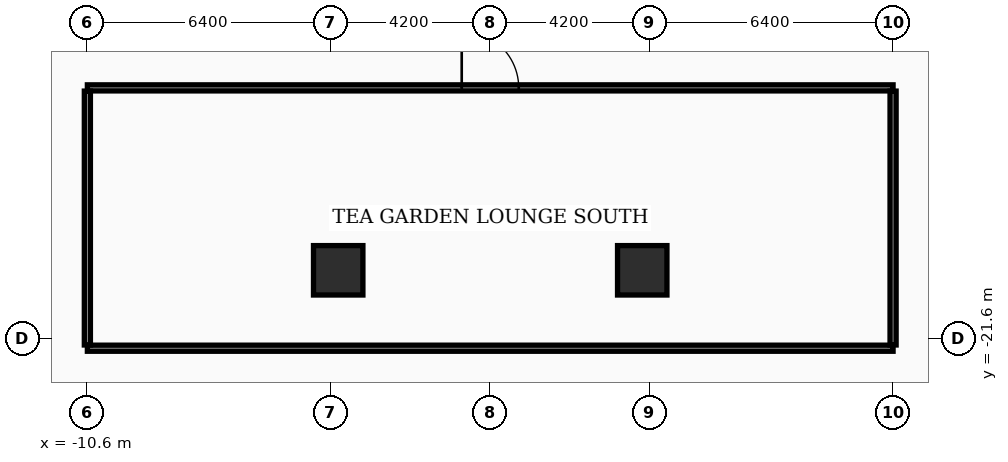
"""IFC4 building model, lengths in metres.
Left out: names, types, materials, properties, quantities, classifications, styles, units other than length and angle.
Written with IfcOpenShell. Run it as: python <this file> out.ifc"""

import sys

from ifc_helpers import new_model, si_unit, direction, frame, frame_2d, origin, origin_2d, place, context, subcontext, project, spatial, rectangle, extrude, element, fill, save


model = new_model("IFC4")
c1 = context("Model", 3, precision=1e-05, world=origin(), true_north=direction((0.0, 1.0)))
c2 = subcontext(c1, "Body", "Model", "MODEL_VIEW")
j1 = project(units=[si_unit("LENGTHUNIT", "METRE"), si_unit("PLANEANGLEUNIT", "RADIAN")], contexts=[c1])
p1 = place(None, origin())
s1 = spatial("IfcSite", under=j1, at=p1, CompositionType="ELEMENT")
p2 = place(p1, origin())
s2 = spatial("IfcBuilding", under=s1, at=p2, CompositionType="ELEMENT")
p3 = place(p2, frame((0.0, 0.0, 14.7)))
s3 = spatial("IfcBuildingStorey", under=s2, at=p3, CompositionType="ELEMENT", Elevation=14.7)
for number, where, z_axis, x_axis in (
    (1, (-4.0, -19.8, 0.0), (0.0, 0.0, 1.0), (1.0, 0.0, 0.0)),
    (2, (4.0, -19.8, 0.0), (0.0, 0.0, 1.0), (1.0, 0.0, 0.0)),
):
    element("IfcColumn", number, at=place(p3, frame(where, z_axis=z_axis, x_axis=x_axis)), inside=s3, PredefinedType="COLUMN", context=c2, shape_type="SweptSolid", body=[
        extrude(rectangle(XDim=1.3, YDim=1.3, at=origin_2d()), origin(), (0.0, 0.0, 1.0), 4.5),
    ])
p4 = place(p3, frame((-10.6, -21.85, 0.0), z_axis=(0.0, 0.0, 1.0), x_axis=(1.0, 0.0, 0.0)))
e3 = element("IfcWall", 3, at=p4, inside=s3, PredefinedType="PARTITIONING", context=c2, shape_type="SweptSolid", body=[
    extrude(rectangle(XDim=21.2, YDim=0.16, at=frame_2d((10.6, 0.0))), origin(), (0.0, 0.0, 1.0), 3.32),
])
p5 = place(p3, frame((-10.6, -15.0, 0.0), z_axis=(0.0, 0.0, 1.0), x_axis=(1.0, 0.0, 0.0)))
e4 = element("IfcWall", 4, at=p5, inside=s3, PredefinedType="PARTITIONING", context=c2, shape_type="SweptSolid", body=[
    extrude(rectangle(XDim=21.2, YDim=0.16, at=frame_2d((10.6, 0.0))), origin(), (0.0, 0.0, 1.0), 3.32),
])
p6 = place(p5, frame((9.85, 0.0, 0.0)))
e5 = element("IfcOpeningElement", 5, at=p6, cuts=e4, PredefinedType="OPENING", context=c2, shape_type="SweptSolid", body=[
    extrude(rectangle(XDim=1.5, YDim=2.15, at=frame_2d((0.75, 1.075))), frame((0.0, 0.09, 0.0), z_axis=(0.0, -1.0, 0.0), x_axis=(1.0, 0.0, 0.0)), (0.0, 0.0, 1.0), 0.18),
])
for number, where, z_axis, x_axis in (
    (6, (-10.6, -21.765, 0.0), (0.0, 0.0, 1.0), (0.0, 1.0, 0.0)),
    (7, (10.6, -21.765, 0.0), (0.0, 0.0, 1.0), (0.0, 1.0, 0.0)),
):
    element("IfcWall", number, at=place(p3, frame(where, z_axis=z_axis, x_axis=x_axis)), inside=s3, PredefinedType="PARTITIONING", context=c2, shape_type="SweptSolid", body=[
        extrude(rectangle(XDim=6.68, YDim=0.16, at=frame_2d((3.34, 0.0))), origin(), (0.0, 0.0, 1.0), 3.32),
    ])
p7 = place(p6, origin())
e8 = element("IfcDoor", 8, at=p7, inside=s3, OperationType="DOUBLE_DOOR_SINGLE_SWING", PredefinedType="DOOR", context=c2, shape_type="SweptSolid", body=[
    extrude(rectangle(XDim=1.5, YDim=2.15, at=frame_2d((0.75, 1.075))), frame((0.0, 0.025, 0.0), z_axis=(0.0, -1.0, 0.0), x_axis=(1.0, 0.0, 0.0)), (0.0, 0.0, 1.0), 0.05),
])
fill(e5, e8)
save(model, sys.argv[1])
